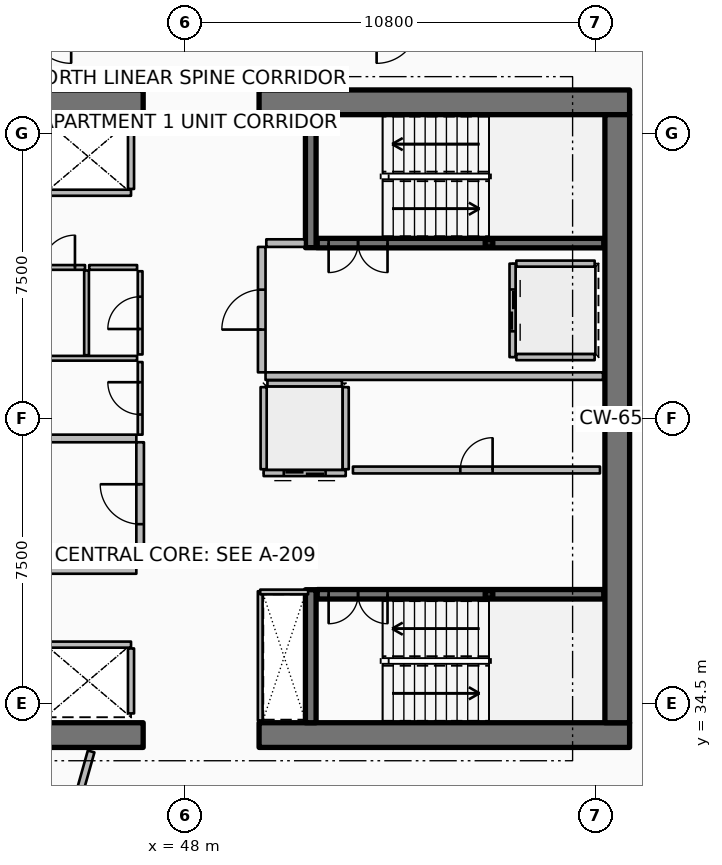
"""IFC4 building model, lengths in metres.
Left out: names, types, materials, properties, quantities, classifications, styles, units other than length and angle.
Written with IfcOpenShell. Run it as: python <this file> out.ifc"""

import sys

from ifc_helpers import new_model, si_unit, direction, frame, frame_2d, origin, origin_2d, place, context, subcontext, project, spatial, rectangle, hollow_rectangle, extrude, element, fill, save


model = new_model("IFC4")
c1 = context("Model", 3, precision=1e-05, world=origin(), true_north=direction((0.0, 1.0)))
c2 = subcontext(c1, "Body", "Model", "MODEL_VIEW")
j1 = project(units=[si_unit("LENGTHUNIT", "METRE"), si_unit("PLANEANGLEUNIT", "RADIAN")], contexts=[c1])
p1 = place(None, origin())
s1 = spatial("IfcSite", under=j1, at=p1, CompositionType="ELEMENT")
p2 = place(p1, origin())
s2 = spatial("IfcBuilding", under=s1, at=p2, CompositionType="ELEMENT")
p3 = place(p2, frame((0.0, 0.0, 180.3)))
s3 = spatial("IfcBuildingStorey", under=s2, at=p3, CompositionType="ELEMENT", Elevation=180.3)
for number, where, z_axis, x_axis in (
    (1, (37.15, 33.675, 0.0), (0.0, 0.0, 1.0), (1.0, 0.0, 0.0)),
    (2, (49.95, 33.675, 0.0), (0.0, 0.0, 1.0), (1.0, 0.0, 0.0)),
    (3, (37.15, 50.325, 0.0), (0.0, 0.0, 1.0), (1.0, 0.0, 0.0)),
    (4, (49.95, 50.325, 0.0), (0.0, 0.0, 1.0), (1.0, 0.0, 0.0)),
):
    element("IfcWall", number, at=place(p3, frame(where, z_axis=z_axis, x_axis=x_axis)), inside=s3, PredefinedType="SHEAR", context=c2, shape_type="SweptSolid", body=[
        extrude(rectangle(XDim=9.75, YDim=0.65, at=frame_2d((4.875, 0.0))), origin(), (0.0, 0.0, 1.0), 3.75),
    ])
p4 = place(p3, frame((59.375, 34.0, 0.0), z_axis=(0.0, 0.0, 1.0), x_axis=(0.0, 1.0, 0.0)))
e5 = element("IfcWall", 5, at=p4, inside=s3, PredefinedType="SHEAR", context=c2, shape_type="SweptSolid", body=[
    extrude(rectangle(XDim=16.0, YDim=0.65, at=frame_2d((8.0, 0.0))), origin(), (0.0, 0.0, 1.0), 3.75),
])
for number, where, z_axis, x_axis in (
    (6, (51.31, 46.5, 0.0), (0.0, 0.0, 1.0), (0.0, 1.0, 0.0)),
    (7, (51.31, 34.0, 0.0), (0.0, 0.0, 1.0), (0.0, 1.0, 0.0)),
):
    element("IfcWall", number, at=place(p3, frame(where, z_axis=z_axis, x_axis=x_axis)), inside=s3, PredefinedType="SHEAR", context=c2, shape_type="SweptSolid", body=[
        extrude(rectangle(XDim=3.5, YDim=0.28, at=frame_2d((1.75, 0.0))), origin(), (0.0, 0.0, 1.0), 3.75),
    ])
for number, where, z_axis, x_axis in (
    (8, (56.0, 46.62, 0.0), (0.0, 0.0, 1.0), (1.0, 0.0, 0.0)),
    (9, (56.0, 37.38, 0.0), (0.0, 0.0, 1.0), (1.0, 0.0, 0.0)),
):
    element("IfcColumn", number, at=place(p3, frame(where, z_axis=z_axis, x_axis=x_axis)), inside=s3, PredefinedType="COLUMN", context=c2, shape_type="SweptSolid", body=[
        extrude(hollow_rectangle(XDim=0.2, YDim=0.2, WallThickness=0.01, InnerFilletRadius=0.01, OuterFilletRadius=0.02, at=origin_2d()), origin(), (0.0, 0.0, 1.0), 1.67),
    ])
p5 = place(p3, frame((51.48, 46.62, 0.0), z_axis=(0.0, 0.0, 1.0), x_axis=(1.0, 0.0, 0.0)))
e10 = element("IfcWall", 10, at=p5, inside=s3, PredefinedType="SOLIDWALL", context=c2, shape_type="SweptSolid", body=[
    extrude(rectangle(XDim=7.54, YDim=0.25, at=frame_2d((3.77, 0.0))), origin(), (0.0, 0.0, 1.0), 3.5),
])
p6 = place(p5, frame((0.3, 0.0, 0.0)))
e11 = element("IfcOpeningElement", 11, at=p6, cuts=e10, PredefinedType="OPENING", context=c2, shape_type="SweptSolid", body=[
    extrude(rectangle(XDim=1.55, YDim=2.15, at=frame_2d((0.775, 1.075))), frame((0.0, 0.135, 0.0), z_axis=(0.0, -1.0, 0.0), x_axis=(1.0, 0.0, 0.0)), (0.0, 0.0, 1.0), 0.27),
])
p7 = place(p3, frame((51.48, 37.38, 0.0), z_axis=(0.0, 0.0, 1.0), x_axis=(1.0, 0.0, 0.0)))
e12 = element("IfcWall", 12, at=p7, inside=s3, PredefinedType="SOLIDWALL", context=c2, shape_type="SweptSolid", body=[
    extrude(rectangle(XDim=7.54, YDim=0.25, at=frame_2d((3.77, 0.0))), origin(), (0.0, 0.0, 1.0), 3.5),
])
p8 = place(p7, frame((0.3, 0.0, 0.0)))
e13 = element("IfcOpeningElement", 13, at=p8, cuts=e12, PredefinedType="OPENING", context=c2, shape_type="SweptSolid", body=[
    extrude(rectangle(XDim=1.55, YDim=2.15, at=frame_2d((0.775, 1.075))), frame((0.0, 0.135, 0.0), z_axis=(0.0, -1.0, 0.0), x_axis=(1.0, 0.0, 0.0)), (0.0, 0.0, 1.0), 0.27),
])
p9 = place(p3, frame((46.58, 47.945, 0.0), z_axis=(0.0, 0.0, 1.0), x_axis=(-1.0, 0.0, 0.0)))
e14 = element("IfcWall", 14, at=p9, inside=s3, PredefinedType="PARTITIONING", context=c2, shape_type="SweptSolid", body=[
    extrude(rectangle(XDim=2.26, YDim=0.16, at=frame_2d((1.13, 0.0))), origin(), (0.0, 0.0, 1.0), 3.5),
])
p10 = place(p3, frame((46.58, 48.045, 0.0), z_axis=(0.0, 0.0, 1.0), x_axis=(0.0, 1.0, 0.0)))
e15 = element("IfcWall", 15, at=p10, inside=s3, PredefinedType="PARTITIONING", context=c2, shape_type="SweptSolid", body=[
    extrude(rectangle(XDim=1.71, YDim=0.16, at=frame_2d((0.855, 0.0))), origin(), (0.0, 0.0, 1.0), 3.5),
])
p11 = place(p3, frame((44.32, 36.055, 0.0), z_axis=(0.0, 0.0, 1.0), x_axis=(1.0, 0.0, 0.0)))
e16 = element("IfcWall", 16, at=p11, inside=s3, PredefinedType="PARTITIONING", context=c2, shape_type="SweptSolid", body=[
    extrude(rectangle(XDim=2.26, YDim=0.16, at=frame_2d((1.13, 0.0))), origin(), (0.0, 0.0, 1.0), 3.5),
])
p12 = place(p3, frame((46.58, 34.245, 0.0), z_axis=(0.0, 0.0, 1.0), x_axis=(0.0, 1.0, 0.0)))
e17 = element("IfcWall", 17, at=p12, inside=s3, PredefinedType="PARTITIONING", context=c2, shape_type="SweptSolid", body=[
    extrude(rectangle(XDim=1.71, YDim=0.16, at=frame_2d((0.855, 0.0))), origin(), (0.0, 0.0, 1.0), 3.5),
])
p13 = place(p3, frame((56.62, 46.08, 0.0), z_axis=(0.0, 0.0, 1.0), x_axis=(0.0, -1.0, 0.0)))
e18 = element("IfcWall", 18, at=p13, inside=s3, PredefinedType="PARTITIONING", context=c2, shape_type="SweptSolid", body=[
    extrude(rectangle(XDim=2.46, YDim=0.16, at=frame_2d((1.23, 0.0))), origin(), (0.0, 0.0, 1.0), 3.5),
])
p14 = place(p13, frame((0.68, 0.0, 0.0)))
e19 = element("IfcOpeningElement", 19, at=p14, cuts=e18, PredefinedType="OPENING", context=c2, shape_type="SweptSolid", body=[
    extrude(rectangle(XDim=1.1, YDim=2.1, at=frame_2d((0.55, 1.05))), frame((0.0, 0.09, 0.0), z_axis=(0.0, -1.0, 0.0), x_axis=(1.0, 0.0, 0.0)), (0.0, 0.0, 1.0), 0.18),
])
for number, where, z_axis, x_axis in (
    (20, (56.72, 46.08, 0.0), (0.0, 0.0, 1.0), (1.0, 0.0, 0.0)),
    (21, (56.72, 43.62, 0.0), (0.0, 0.0, 1.0), (1.0, 0.0, 0.0)),
):
    element("IfcWall", number, at=place(p3, frame(where, z_axis=z_axis, x_axis=x_axis)), inside=s3, PredefinedType="PARTITIONING", context=c2, shape_type="SweptSolid", body=[
        extrude(rectangle(XDim=2.06, YDim=0.16, at=frame_2d((1.03, 0.0))), origin(), (0.0, 0.0, 1.0), 3.5),
    ])
p15 = place(p3, frame((52.23, 40.57, 0.0), z_axis=(0.0, 0.0, 1.0), x_axis=(-1.0, 0.0, 0.0)))
e22 = element("IfcWall", 22, at=p15, inside=s3, PredefinedType="PARTITIONING", context=c2, shape_type="SweptSolid", body=[
    extrude(rectangle(XDim=2.16, YDim=0.16, at=frame_2d((1.08, 0.0))), origin(), (0.0, 0.0, 1.0), 3.5),
])
p16 = place(p15, frame((0.53, 0.0, 0.0)))
e23 = element("IfcOpeningElement", 23, at=p16, cuts=e22, PredefinedType="OPENING", context=c2, shape_type="SweptSolid", body=[
    extrude(rectangle(XDim=1.1, YDim=2.1, at=frame_2d((0.55, 1.05))), frame((0.0, 0.09, 0.0), z_axis=(0.0, -1.0, 0.0), x_axis=(1.0, 0.0, 0.0)), (0.0, 0.0, 1.0), 0.18),
])
for number, where, z_axis, x_axis in (
    (24, (52.23, 40.67, 0.0), (0.0, 0.0, 1.0), (0.0, 1.0, 0.0)),
    (25, (50.07, 40.67, 0.0), (0.0, 0.0, 1.0), (0.0, 1.0, 0.0)),
):
    element("IfcWall", number, at=place(p3, frame(where, z_axis=z_axis, x_axis=x_axis)), inside=s3, PredefinedType="PARTITIONING", context=c2, shape_type="SweptSolid", body=[
        extrude(rectangle(XDim=2.16, YDim=0.16, at=frame_2d((1.08, 0.0))), origin(), (0.0, 0.0, 1.0), 3.5),
    ])
p17 = place(p3, frame((50.17, 42.93, 0.0), z_axis=(0.0, 0.0, 1.0), x_axis=(1.0, 0.0, 0.0)))
e26 = element("IfcWall", 26, at=p17, inside=s3, PredefinedType="PARTITIONING", context=c2, shape_type="SweptSolid", body=[
    extrude(rectangle(XDim=1.96, YDim=0.16, at=frame_2d((0.98, 0.0))), origin(), (0.0, 0.0, 1.0), 3.5),
])
p18 = place(p3, frame((52.42, 40.65, 0.0), z_axis=(0.0, 0.0, 1.0), x_axis=(1.0, 0.0, 0.0)))
e27 = element("IfcWall", 27, at=p18, inside=s3, PredefinedType="PARTITIONING", context=c2, shape_type="SweptSolid", body=[
    extrude(rectangle(XDim=6.5, YDim=0.18, at=frame_2d((3.25, 0.0))), origin(), (0.0, 0.0, 1.0), 3.5),
])
p19 = place(p18, frame((2.825, 0.0, 0.0)))
e28 = element("IfcOpeningElement", 28, at=p19, cuts=e27, PredefinedType="OPENING", context=c2, shape_type="SweptSolid", body=[
    extrude(rectangle(XDim=0.85, YDim=2.06, at=frame_2d((0.425, 1.03))), frame((0.0, 0.1, 0.0), z_axis=(0.0, -1.0, 0.0), x_axis=(1.0, 0.0, 0.0)), (0.0, 0.0, 1.0), 0.2),
])
p20 = place(p3, frame((41.35, 38.02, 0.0), z_axis=(0.0, 0.0, 1.0), x_axis=(1.0, 0.0, 0.0)))
e29 = element("IfcWall", 29, at=p20, inside=s3, PredefinedType="PARTITIONING", context=c2, shape_type="SweptSolid", body=[
    extrude(rectangle(XDim=5.37, YDim=0.2, at=frame_2d((2.685, 0.0))), origin(), (0.0, 0.0, 1.0), 3.5),
])
p21 = place(p3, frame((43.92, 41.48, 0.0), z_axis=(0.0, 0.0, 1.0), x_axis=(1.0, 0.0, 0.0)))
e30 = element("IfcWall", 30, at=p21, inside=s3, PredefinedType="PARTITIONING", context=c2, shape_type="SweptSolid", body=[
    extrude(rectangle(XDim=2.8, YDim=0.2, at=frame_2d((1.4, 0.0))), origin(), (0.0, 0.0, 1.0), 3.5),
])
p22 = place(p3, frame((46.82, 38.12, 0.0), z_axis=(0.0, 0.0, 1.0), x_axis=(0.0, 1.0, 0.0)))
e31 = element("IfcWall", 31, at=p22, inside=s3, PredefinedType="PARTITIONING", context=c2, shape_type="SweptSolid", body=[
    extrude(rectangle(XDim=3.26, YDim=0.2, at=frame_2d((1.63, 0.0))), origin(), (0.0, 0.0, 1.0), 3.5),
])
p23 = place(p22, frame((1.105, 0.0, 0.0)))
e32 = element("IfcOpeningElement", 32, at=p23, cuts=e31, PredefinedType="OPENING", context=c2, shape_type="SweptSolid", body=[
    extrude(rectangle(XDim=1.05, YDim=2.1, at=frame_2d((0.525, 1.05))), frame((0.0, 0.11, 0.0), z_axis=(0.0, -1.0, 0.0), x_axis=(1.0, 0.0, 0.0)), (0.0, 0.0, 1.0), 0.22),
])
p24 = place(p3, frame((50.12, 43.12, 0.0), z_axis=(0.0, 0.0, 1.0), x_axis=(1.0, 0.0, 0.0)))
e33 = element("IfcWall", 33, at=p24, inside=s3, PredefinedType="PARTITIONING", context=c2, shape_type="SweptSolid", body=[
    extrude(rectangle(XDim=8.88, YDim=0.2, at=frame_2d((4.44, 0.0))), origin(), (0.0, 0.0, 1.0), 3.5),
])
p25 = place(p3, frame((50.14, 46.62, 0.0), z_axis=(0.0, 0.0, 1.0), x_axis=(1.0, 0.0, 0.0)))
e34 = element("IfcWall", 34, at=p25, inside=s3, PredefinedType="PARTITIONING", context=c2, shape_type="SweptSolid", body=[
    extrude(rectangle(XDim=1.02, YDim=0.2, at=frame_2d((0.51, 0.0))), origin(), (0.0, 0.0, 1.0), 3.5),
])
p26 = place(p3, frame((50.02, 43.22, 0.0), z_axis=(0.0, 0.0, 1.0), x_axis=(0.0, 1.0, 0.0)))
e35 = element("IfcWall", 35, at=p26, inside=s3, PredefinedType="PARTITIONING", context=c2, shape_type="SweptSolid", body=[
    extrude(rectangle(XDim=3.3, YDim=0.2, at=frame_2d((1.65, 0.0))), origin(), (0.0, 0.0, 1.0), 3.5),
])
p27 = place(p26, frame((1.125, 0.0, 0.0)))
e36 = element("IfcOpeningElement", 36, at=p27, cuts=e35, PredefinedType="OPENING", context=c2, shape_type="SweptSolid", body=[
    extrude(rectangle(XDim=1.05, YDim=2.1, at=frame_2d((0.525, 1.05))), frame((0.0, 0.11, 0.0), z_axis=(0.0, -1.0, 0.0), x_axis=(1.0, 0.0, 0.0)), (0.0, 0.0, 1.0), 0.22),
])
p28 = place(p3, frame((49.98, 34.06, 0.0), z_axis=(0.0, 0.0, 1.0), x_axis=(0.0, 1.0, 0.0)))
e37 = element("IfcWall", 37, at=p28, inside=s3, PredefinedType="PARTITIONING", context=c2, shape_type="SweptSolid", body=[
    extrude(rectangle(XDim=3.4, YDim=0.125, at=frame_2d((1.7, 0.0))), origin(), (0.0, 0.0, 1.0), 2.94),
])
p29 = place(p3, frame((49.98, 37.44, 0.0), z_axis=(0.0, 0.0, 1.0), x_axis=(1.0, 0.0, 0.0)))
e38 = element("IfcWall", 38, at=p29, inside=s3, PredefinedType="PARTITIONING", context=c2, shape_type="SweptSolid", body=[
    extrude(rectangle(XDim=1.26, YDim=0.125, at=frame_2d((0.63, 0.0))), origin(), (0.0, 0.0, 1.0), 2.94),
])
p30 = place(p3, frame((44.03, 43.59, 0.0), z_axis=(0.0, 0.0, 1.0), x_axis=(1.0, 0.0, 0.0)))
e39 = element("IfcWall", 39, at=p30, inside=s3, PredefinedType="PARTITIONING", context=c2, shape_type="SweptSolid", body=[
    extrude(rectangle(XDim=2.71, YDim=0.125, at=frame_2d((1.355, 0.0))), origin(), (0.0, 0.0, 1.0), 2.94),
])
p31 = place(p3, frame((45.41, 43.67, 0.0), z_axis=(0.0, 0.0, 1.0), x_axis=(0.0, 1.0, 0.0)))
e40 = element("IfcWall", 40, at=p31, inside=s3, PredefinedType="PARTITIONING", context=c2, shape_type="SweptSolid", body=[
    extrude(rectangle(XDim=2.23, YDim=0.125, at=frame_2d((1.115, 0.0))), origin(), (0.0, 0.0, 1.0), 2.94),
])
p32 = place(p3, frame((46.82, 41.58, 0.0), z_axis=(0.0, 0.0, 1.0), x_axis=(0.0, 1.0, 0.0)))
e41 = element("IfcWall", 41, at=p32, inside=s3, PredefinedType="PARTITIONING", context=c2, shape_type="SweptSolid", body=[
    extrude(rectangle(XDim=1.91, YDim=0.125, at=frame_2d((0.955, 0.0))), origin(), (0.0, 0.0, 1.0), 2.94),
])
p33 = place(p32, frame((0.53, 0.0, 0.0)))
e42 = element("IfcOpeningElement", 42, at=p33, cuts=e41, PredefinedType="OPENING", context=c2, shape_type="SweptSolid", body=[
    extrude(rectangle(XDim=0.85, YDim=2.06, at=frame_2d((0.425, 1.03))), frame((0.0, 0.073, 0.0), z_axis=(0.0, -1.0, 0.0), x_axis=(1.0, 0.0, 0.0)), (0.0, 0.0, 1.0), 0.145),
])
p34 = place(p3, frame((46.82, 43.69, 0.0), z_axis=(0.0, 0.0, 1.0), x_axis=(0.0, 1.0, 0.0)))
e43 = element("IfcWall", 43, at=p34, inside=s3, PredefinedType="PARTITIONING", context=c2, shape_type="SweptSolid", body=[
    extrude(rectangle(XDim=2.19, YDim=0.125, at=frame_2d((1.095, 0.0))), origin(), (0.0, 0.0, 1.0), 2.94),
])
p35 = place(p34, frame((0.67, 0.0, 0.0)))
e44 = element("IfcOpeningElement", 44, at=p35, cuts=e43, PredefinedType="OPENING", context=c2, shape_type="SweptSolid", body=[
    extrude(rectangle(XDim=0.85, YDim=2.06, at=frame_2d((0.425, 1.03))), frame((0.0, 0.073, 0.0), z_axis=(0.0, -1.0, 0.0), x_axis=(1.0, 0.0, 0.0)), (0.0, 0.0, 1.0), 0.145),
])
p36 = place(p3, frame((43.99, 45.98, 0.0), z_axis=(0.0, 0.0, 1.0), x_axis=(1.0, 0.0, 0.0)))
e45 = element("IfcWall", 45, at=p36, inside=s3, PredefinedType="PARTITIONING", context=c2, shape_type="SweptSolid", body=[
    extrude(rectangle(XDim=1.38, YDim=0.125, at=frame_2d((0.69, 0.0))), origin(), (0.0, 0.0, 1.0), 2.94),
])
p37 = place(p36, frame((0.265, 0.0, 0.0)))
e46 = element("IfcOpeningElement", 46, at=p37, cuts=e45, PredefinedType="OPENING", context=c2, shape_type="SweptSolid", body=[
    extrude(rectangle(XDim=0.85, YDim=2.06, at=frame_2d((0.425, 1.03))), frame((0.0, 0.073, 0.0), z_axis=(0.0, -1.0, 0.0), x_axis=(1.0, 0.0, 0.0)), (0.0, 0.0, 1.0), 0.145),
])
p38 = place(p3, frame((45.48, 45.98, 0.0), z_axis=(0.0, 0.0, 1.0), x_axis=(1.0, 0.0, 0.0)))
e47 = element("IfcWall", 47, at=p38, inside=s3, PredefinedType="PARTITIONING", context=c2, shape_type="SweptSolid", body=[
    extrude(rectangle(XDim=1.26, YDim=0.125, at=frame_2d((0.63, 0.0))), origin(), (0.0, 0.0, 1.0), 2.94),
])
p39 = place(p3, frame((45.531, 33.244, 0.0), z_axis=(0.0, 0.0, 1.0), x_axis=(-0.271437162306, -0.962456163635, 0.0)))
e48 = element("IfcWall", 48, at=p39, inside=s3, PredefinedType="PARTITIONING", context=c2, shape_type="SweptSolid", body=[
    extrude(rectangle(XDim=15.63, YDim=0.18, at=frame_2d((7.815, 0.0))), origin(), (0.0, 0.0, 1.0), 2.94),
])
p40 = place(p6, origin())
e49 = element("IfcDoor", 49, at=p40, inside=s3, OperationType="DOUBLE_DOOR_SINGLE_SWING", PredefinedType="DOOR", context=c2, shape_type="SweptSolid", body=[
    extrude(rectangle(XDim=1.55, YDim=2.15, at=frame_2d((0.775, 1.075))), frame((0.0, 0.025, 0.0), z_axis=(0.0, -1.0, 0.0), x_axis=(1.0, 0.0, 0.0)), (0.0, 0.0, 1.0), 0.05),
])
fill(e11, e49)
p41 = place(p8, origin())
e50 = element("IfcDoor", 50, at=p41, inside=s3, OperationType="DOUBLE_DOOR_SINGLE_SWING", PredefinedType="DOOR", context=c2, shape_type="SweptSolid", body=[
    extrude(rectangle(XDim=1.55, YDim=2.15, at=frame_2d((0.775, 1.075))), frame((0.0, 0.025, 0.0), z_axis=(0.0, -1.0, 0.0), x_axis=(1.0, 0.0, 0.0)), (0.0, 0.0, 1.0), 0.05),
])
fill(e13, e50)
p42 = place(p14, origin())
e51 = element("IfcDoor", 51, at=p42, inside=s3, OperationType="DOUBLE_DOOR_SLIDING", PredefinedType="DOOR", context=c2, shape_type="SweptSolid", body=[
    extrude(rectangle(XDim=1.1, YDim=2.1, at=frame_2d((0.55, 1.05))), frame((0.0, 0.025, 0.0), z_axis=(0.0, -1.0, 0.0), x_axis=(1.0, 0.0, 0.0)), (0.0, 0.0, 1.0), 0.05),
])
fill(e19, e51)
p43 = place(p16, origin())
e52 = element("IfcDoor", 52, at=p43, inside=s3, OperationType="DOUBLE_DOOR_SLIDING", PredefinedType="DOOR", context=c2, shape_type="SweptSolid", body=[
    extrude(rectangle(XDim=1.1, YDim=2.1, at=frame_2d((0.55, 1.05))), frame((0.0, 0.025, 0.0), z_axis=(0.0, -1.0, 0.0), x_axis=(1.0, 0.0, 0.0)), (0.0, 0.0, 1.0), 0.05),
])
fill(e23, e52)
p44 = place(p19, origin())
e53 = element("IfcDoor", 53, at=p44, inside=s3, OperationType="SINGLE_SWING_RIGHT", PredefinedType="DOOR", context=c2, shape_type="SweptSolid", body=[
    extrude(rectangle(XDim=0.85, YDim=2.06, at=frame_2d((0.425, 1.03))), frame((0.0, 0.025, 0.0), z_axis=(0.0, -1.0, 0.0), x_axis=(1.0, 0.0, 0.0)), (0.0, 0.0, 1.0), 0.05),
])
fill(e28, e53)
p45 = place(p23, origin())
e54 = element("IfcDoor", 54, at=p45, inside=s3, OperationType="SINGLE_SWING_RIGHT", PredefinedType="DOOR", context=c2, shape_type="SweptSolid", body=[
    extrude(rectangle(XDim=1.05, YDim=2.1, at=frame_2d((0.525, 1.05))), frame((0.0, 0.025, 0.0), z_axis=(0.0, -1.0, 0.0), x_axis=(1.0, 0.0, 0.0)), (0.0, 0.0, 1.0), 0.05),
])
fill(e32, e54)
p46 = place(p27, origin())
e55 = element("IfcDoor", 55, at=p46, inside=s3, OperationType="SINGLE_SWING_LEFT", PredefinedType="DOOR", context=c2, shape_type="SweptSolid", body=[
    extrude(rectangle(XDim=1.05, YDim=2.1, at=frame_2d((0.525, 1.05))), frame((0.0, 0.025, 0.0), z_axis=(0.0, -1.0, 0.0), x_axis=(1.0, 0.0, 0.0)), (0.0, 0.0, 1.0), 0.05),
])
fill(e36, e55)
p47 = place(p33, origin())
e56 = element("IfcDoor", 56, at=p47, inside=s3, OperationType="SINGLE_SWING_RIGHT", PredefinedType="DOOR", context=c2, shape_type="SweptSolid", body=[
    extrude(rectangle(XDim=0.85, YDim=2.06, at=frame_2d((0.425, 1.03))), frame((0.0, 0.025, 0.0), z_axis=(0.0, -1.0, 0.0), x_axis=(1.0, 0.0, 0.0)), (0.0, 0.0, 1.0), 0.05),
])
fill(e42, e56)
p48 = place(p35, origin())
e57 = element("IfcDoor", 57, at=p48, inside=s3, OperationType="SINGLE_SWING_LEFT", PredefinedType="DOOR", context=c2, shape_type="SweptSolid", body=[
    extrude(rectangle(XDim=0.85, YDim=2.06, at=frame_2d((0.425, 1.03))), frame((0.0, 0.025, 0.0), z_axis=(0.0, -1.0, 0.0), x_axis=(1.0, 0.0, 0.0)), (0.0, 0.0, 1.0), 0.05),
])
fill(e44, e57)
p49 = place(p37, origin())
e58 = element("IfcDoor", 58, at=p49, inside=s3, OperationType="SINGLE_SWING_RIGHT", PredefinedType="DOOR", context=c2, shape_type="SweptSolid", body=[
    extrude(rectangle(XDim=0.85, YDim=2.06, at=frame_2d((0.425, 1.03))), frame((0.0, 0.025, 0.0), z_axis=(0.0, -1.0, 0.0), x_axis=(1.0, 0.0, 0.0)), (0.0, 0.0, 1.0), 0.05),
])
fill(e46, e58)
save(model, sys.argv[1])
